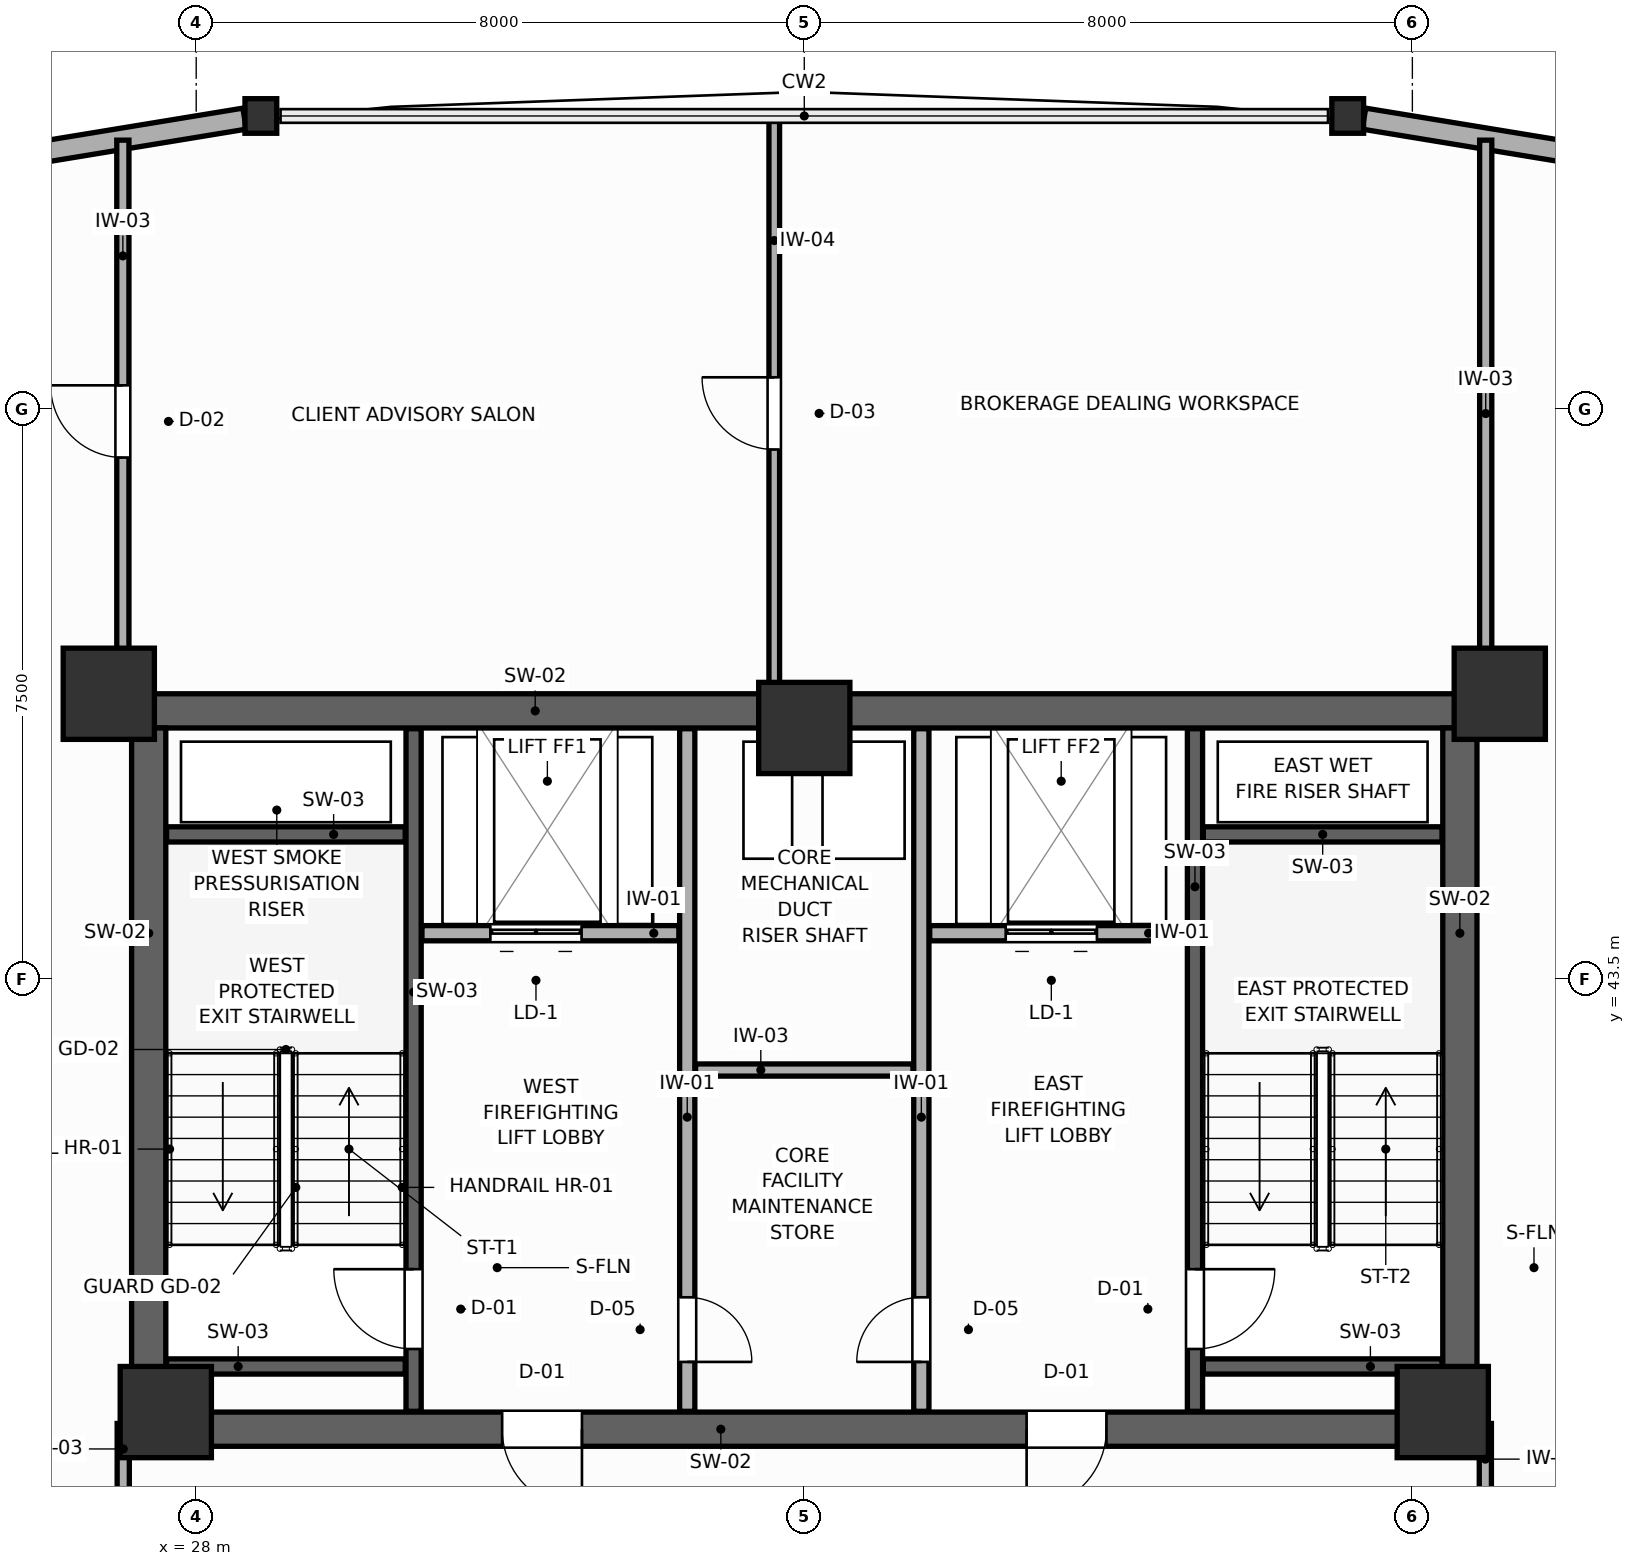
"""IFC4 building model, lengths in metres.
Left out: names, types, materials, properties, quantities, classifications, styles, units other than length and angle.
Written with IfcOpenShell. Run it as: python <this file> out.ifc"""

import sys

from ifc_helpers import new_model, si_unit, direction, frame, frame_2d, origin, origin_2d, place, context, subcontext, project, spatial, rectangle, i_section, extrude, source, transform, mapped, element, fill, save


model = new_model("IFC4")
c1 = context("Model", 3, precision=1e-05, world=origin(), true_north=direction((0.0, 1.0)))
c2 = subcontext(c1, "Body", "Model", "MODEL_VIEW")
j1 = project(units=[si_unit("LENGTHUNIT", "METRE"), si_unit("PLANEANGLEUNIT", "RADIAN")], contexts=[c1])
p1 = place(None, origin())
s1 = spatial("IfcSite", under=j1, at=p1, CompositionType="ELEMENT")
p2 = place(p1, origin())
s2 = spatial("IfcBuilding", under=s1, at=p2, CompositionType="ELEMENT")
p3 = place(p2, frame((0.0, 0.0, 102.6)))
s3 = spatial("IfcBuildingStorey", under=s2, at=p3, CompositionType="ELEMENT", Elevation=102.6)
p4 = place(p3, frame((27.15, 47.025, 0.0), z_axis=(0.0, 0.0, 1.0), x_axis=(1.0, 0.0, 0.0)))
e1 = element("IfcWall", 1, at=p4, inside=s3, PredefinedType="SHEAR", context=c2, shape_type="SweptSolid", body=[
    extrude(rectangle(XDim=17.7, YDim=0.45, at=frame_2d((8.85, 0.0))), origin(), (0.0, 0.0, 1.0), 3.6),
])
p5 = place(p3, frame((27.15, 37.575, 0.0), z_axis=(0.0, 0.0, 1.0), x_axis=(1.0, 0.0, 0.0)))
e2 = element("IfcWall", 2, at=p5, inside=s3, PredefinedType="SHEAR", context=c2, shape_type="SweptSolid", body=[
    extrude(rectangle(XDim=17.7, YDim=0.45, at=frame_2d((8.85, 0.0))), origin(), (0.0, 0.0, 1.0), 3.6),
])
p6 = place(p5, frame((4.875, 0.0, 0.0)))
e3 = element("IfcOpeningElement", 3, at=p6, cuts=e2, PredefinedType="OPENING", context=c2, shape_type="SweptSolid", body=[
    extrude(rectangle(XDim=1.05, YDim=2.1, at=frame_2d((0.525, 1.05))), frame((0.0, 0.235, 0.0), z_axis=(0.0, -1.0, 0.0), x_axis=(1.0, 0.0, 0.0)), (0.0, 0.0, 1.0), 0.47),
])
p7 = place(p5, frame((11.775, 0.0, 0.0)))
e4 = element("IfcOpeningElement", 4, at=p7, cuts=e2, PredefinedType="OPENING", context=c2, shape_type="SweptSolid", body=[
    extrude(rectangle(XDim=1.05, YDim=2.1, at=frame_2d((0.525, 1.05))), frame((0.0, 0.235, 0.0), z_axis=(0.0, -1.0, 0.0), x_axis=(1.0, 0.0, 0.0)), (0.0, 0.0, 1.0), 0.47),
])
for number, where, z_axis, x_axis in (
    (5, (27.375, 37.8, 0.0), (0.0, 0.0, 1.0), (0.0, 1.0, 0.0)),
    (6, (44.625, 37.8, 0.0), (0.0, 0.0, 1.0), (0.0, 1.0, 0.0)),
):
    element("IfcWall", number, at=place(p3, frame(where, z_axis=z_axis, x_axis=x_axis)), inside=s3, PredefinedType="SHEAR", context=c2, shape_type="SweptSolid", body=[
        extrude(rectangle(XDim=9.0, YDim=0.45, at=frame_2d((4.5, 0.0))), origin(), (0.0, 0.0, 1.0), 3.6),
    ])
m1 = source(origin(), c2, "Body", "SweptSolid", [
    extrude(rectangle(XDim=1.2, YDim=1.2, at=origin_2d()), origin(), (0.0, 0.0, 1.0), 3.6),
])
for number, where, z_axis, x_axis in (
    (7, (26.85, 47.25, 0.0), (0.0, 0.0, 1.0), (1.0, 0.0, 0.0)),
    (8, (45.15, 47.25, 0.0), (0.0, 0.0, 1.0), (1.0, 0.0, 0.0)),
    (9, (27.6, 37.8, 0.0), (0.0, 0.0, 1.0), (1.0, 0.0, 0.0)),
    (10, (44.4, 37.8, 0.0), (0.0, 0.0, 1.0), (1.0, 0.0, 0.0)),
    (11, (36.0, 46.8, 0.0), (0.0, 0.0, 1.0), (1.0, 0.0, 0.0)),
):
    element("IfcColumn", number, at=place(p3, frame(where, z_axis=z_axis, x_axis=x_axis)), inside=s3, PredefinedType="COLUMN", context=c2, shape_type="MappedRepresentation", body=[
        mapped(m1, transform((0.0, 0.0, 0.0), scale=1.0)),
    ])
m2 = source(origin(), c2, "Body", "SweptSolid", [
    extrude(i_section(OverallWidth=0.418, OverallDepth=0.455, WebThickness=0.039, FlangeThickness=0.063, FilletRadius=0.015, at=origin_2d()), origin(), (0.0, 0.0, 1.0), 3.6),
])
for number, where, z_axis, x_axis in (
    (12, (43.149, 54.852, 0.0), (0.0, 0.0, 1.0), (1.0, 0.0, 0.0)),
    (13, (28.851, 54.852, 0.0), (0.0, 0.0, 1.0), (1.0, 0.0, 0.0)),
):
    element("IfcColumn", number, at=place(p3, frame(where, z_axis=z_axis, x_axis=x_axis)), inside=s3, PredefinedType="COLUMN", context=c2, shape_type="MappedRepresentation", body=[
        mapped(m2, transform((0.0, 0.0, 0.0), scale=1.0)),
    ])
p8 = place(p3, frame((59.569, 52.155, 0.0), z_axis=(0.0, 0.0, 1.0), x_axis=(-0.986776921995, 0.162084256539, 0.0)))
e14 = element("IfcWall", 14, at=p8, inside=s3, PredefinedType="SOLIDWALL", context=c2, shape_type="SweptSolid", body=[
    extrude(rectangle(XDim=16.423, YDim=0.28, at=frame_2d((8.211, 0.0))), origin(), (0.0, 0.0, 1.0), 3.0),
])
p9 = place(p3, frame((28.637, 54.816, 0.0), z_axis=(0.0, 0.0, 1.0), x_axis=(-0.986776921995, -0.162084256539, 0.0)))
e15 = element("IfcWall", 15, at=p9, inside=s3, PredefinedType="SOLIDWALL", context=c2, shape_type="SweptSolid", body=[
    extrude(rectangle(XDim=16.423, YDim=0.28, at=frame_2d((8.211, 0.0))), origin(), (0.0, 0.0, 1.0), 2.95),
])
p10 = place(p3, frame((30.86, 37.81, 0.0), z_axis=(0.0, 0.0, 1.0), x_axis=(0.0, 1.0, 0.0)))
e16 = element("IfcWall", 16, at=p10, inside=s3, PredefinedType="SHEAR", context=c2, shape_type="SweptSolid", body=[
    extrude(rectangle(XDim=8.98, YDim=0.2, at=frame_2d((4.49, 0.0))), origin(), (0.0, 0.0, 1.0), 3.6),
])
p11 = place(p10, frame((0.82, 0.0, 0.0)))
e17 = element("IfcOpeningElement", 17, at=p11, cuts=e16, PredefinedType="OPENING", context=c2, shape_type="SweptSolid", body=[
    extrude(rectangle(XDim=1.05, YDim=2.1, at=frame_2d((0.525, 1.05))), frame((0.0, 0.11, 0.0), z_axis=(0.0, -1.0, 0.0), x_axis=(1.0, 0.0, 0.0)), (0.0, 0.0, 1.0), 0.22),
])
for number, where, z_axis, x_axis in (
    (18, (27.61, 45.4, 0.0), (0.0, 0.0, 1.0), (1.0, 0.0, 0.0)),
    (19, (27.61, 38.4, 0.0), (0.0, 0.0, 1.0), (1.0, 0.0, 0.0)),
):
    element("IfcWall", number, at=place(p3, frame(where, z_axis=z_axis, x_axis=x_axis)), inside=s3, PredefinedType="SHEAR", context=c2, shape_type="SweptSolid", body=[
        extrude(rectangle(XDim=3.14, YDim=0.2, at=frame_2d((1.57, 0.0))), origin(), (0.0, 0.0, 1.0), 3.6),
    ])
p12 = place(p3, frame((41.14, 37.81, 0.0), z_axis=(0.0, 0.0, 1.0), x_axis=(0.0, 1.0, 0.0)))
e20 = element("IfcWall", 20, at=p12, inside=s3, PredefinedType="SHEAR", context=c2, shape_type="SweptSolid", body=[
    extrude(rectangle(XDim=8.98, YDim=0.2, at=frame_2d((4.49, 0.0))), origin(), (0.0, 0.0, 1.0), 3.6),
])
p13 = place(p12, frame((0.82, 0.0, 0.0)))
e21 = element("IfcOpeningElement", 21, at=p13, cuts=e20, PredefinedType="OPENING", context=c2, shape_type="SweptSolid", body=[
    extrude(rectangle(XDim=1.05, YDim=2.1, at=frame_2d((0.525, 1.05))), frame((0.0, 0.11, 0.0), z_axis=(0.0, -1.0, 0.0), x_axis=(1.0, 0.0, 0.0)), (0.0, 0.0, 1.0), 0.22),
])
for number, where, z_axis, x_axis in (
    (22, (41.25, 45.4, 0.0), (0.0, 0.0, 1.0), (1.0, 0.0, 0.0)),
    (23, (41.25, 38.4, 0.0), (0.0, 0.0, 1.0), (1.0, 0.0, 0.0)),
):
    element("IfcWall", number, at=place(p3, frame(where, z_axis=z_axis, x_axis=x_axis)), inside=s3, PredefinedType="SHEAR", context=c2, shape_type="SweptSolid", body=[
        extrude(rectangle(XDim=3.14, YDim=0.2, at=frame_2d((1.57, 0.0))), origin(), (0.0, 0.0, 1.0), 3.6),
    ])
p14 = place(p3, frame((30.97, 44.1, 0.0), z_axis=(0.0, 0.0, 1.0), x_axis=(1.0, 0.0, 0.0)))
e24 = element("IfcWall", 24, at=p14, inside=s3, PredefinedType="PARTITIONING", context=c2, shape_type="SweptSolid", body=[
    extrude(rectangle(XDim=3.38, YDim=0.2, at=frame_2d((1.69, 0.0))), origin(), (0.0, 0.0, 1.0), 3.4),
])
p15 = place(p14, frame((0.9, 0.0, 0.0)))
e25 = element("IfcOpeningElement", 25, at=p15, cuts=e24, PredefinedType="OPENING", context=c2, shape_type="SweptSolid", body=[
    extrude(rectangle(XDim=1.2, YDim=2.1, at=frame_2d((0.6, 1.05))), frame((0.0, 0.11, 0.0), z_axis=(0.0, -1.0, 0.0), x_axis=(1.0, 0.0, 0.0)), (0.0, 0.0, 1.0), 0.22),
])
p16 = place(p3, frame((37.65, 44.1, 0.0), z_axis=(0.0, 0.0, 1.0), x_axis=(1.0, 0.0, 0.0)))
e26 = element("IfcWall", 26, at=p16, inside=s3, PredefinedType="PARTITIONING", context=c2, shape_type="SweptSolid", body=[
    extrude(rectangle(XDim=3.38, YDim=0.2, at=frame_2d((1.69, 0.0))), origin(), (0.0, 0.0, 1.0), 3.4),
])
p17 = place(p16, frame((1.0, 0.0, 0.0)))
e27 = element("IfcOpeningElement", 27, at=p17, cuts=e26, PredefinedType="OPENING", context=c2, shape_type="SweptSolid", body=[
    extrude(rectangle(XDim=1.2, YDim=2.1, at=frame_2d((0.6, 1.05))), frame((0.0, 0.11, 0.0), z_axis=(0.0, -1.0, 0.0), x_axis=(1.0, 0.0, 0.0)), (0.0, 0.0, 1.0), 0.22),
])
p18 = place(p3, frame((34.46, 37.81, 0.0), z_axis=(0.0, 0.0, 1.0), x_axis=(0.0, 1.0, 0.0)))
e28 = element("IfcWall", 28, at=p18, inside=s3, PredefinedType="PARTITIONING", context=c2, shape_type="SweptSolid", body=[
    extrude(rectangle(XDim=8.98, YDim=0.2, at=frame_2d((4.49, 0.0))), origin(), (0.0, 0.0, 1.0), 3.4),
])
p19 = place(p18, frame((0.65, 0.0, 0.0)))
e29 = element("IfcOpeningElement", 29, at=p19, cuts=e28, PredefinedType="OPENING", context=c2, shape_type="SweptSolid", body=[
    extrude(rectangle(XDim=0.85, YDim=2.05, at=frame_2d((0.425, 1.025))), frame((0.0, 0.11, 0.0), z_axis=(0.0, -1.0, 0.0), x_axis=(1.0, 0.0, 0.0)), (0.0, 0.0, 1.0), 0.22),
])
p20 = place(p3, frame((37.54, 37.81, 0.0), z_axis=(0.0, 0.0, 1.0), x_axis=(0.0, 1.0, 0.0)))
e30 = element("IfcWall", 30, at=p20, inside=s3, PredefinedType="PARTITIONING", context=c2, shape_type="SweptSolid", body=[
    extrude(rectangle(XDim=8.98, YDim=0.2, at=frame_2d((4.49, 0.0))), origin(), (0.0, 0.0, 1.0), 3.4),
])
p21 = place(p20, frame((0.65, 0.0, 0.0)))
e31 = element("IfcOpeningElement", 31, at=p21, cuts=e30, PredefinedType="OPENING", context=c2, shape_type="SweptSolid", body=[
    extrude(rectangle(XDim=0.85, YDim=2.05, at=frame_2d((0.425, 1.025))), frame((0.0, 0.11, 0.0), z_axis=(0.0, -1.0, 0.0), x_axis=(1.0, 0.0, 0.0)), (0.0, 0.0, 1.0), 0.22),
])
p22 = place(p3, frame((34.57, 42.3, 0.0), z_axis=(0.0, 0.0, 1.0), x_axis=(1.0, 0.0, 0.0)))
e32 = element("IfcWall", 32, at=p22, inside=s3, PredefinedType="PARTITIONING", context=c2, shape_type="SweptSolid", body=[
    extrude(rectangle(XDim=2.86, YDim=0.16, at=frame_2d((1.43, 0.0))), origin(), (0.0, 0.0, 1.0), 3.4),
])
p23 = place(p3, frame((27.04, 35.0, 0.0), z_axis=(0.0, 0.0, 1.0), x_axis=(0.0, 1.0, 0.0)))
e33 = element("IfcWall", 33, at=p23, inside=s3, PredefinedType="PARTITIONING", context=c2, shape_type="SweptSolid", body=[
    extrude(rectangle(XDim=2.65, YDim=0.16, at=frame_2d((1.325, 0.0))), origin(), (0.0, 0.0, 1.0), 3.4),
])
p24 = place(p23, frame((0.75, 0.0, 0.0)))
e34 = element("IfcOpeningElement", 34, at=p24, cuts=e33, PredefinedType="OPENING", context=c2, shape_type="SweptSolid", body=[
    extrude(rectangle(XDim=1.05, YDim=2.1, at=frame_2d((0.525, 1.05))), frame((0.0, 0.09, 0.0), z_axis=(0.0, -1.0, 0.0), x_axis=(1.0, 0.0, 0.0)), (0.0, 0.0, 1.0), 0.18),
])
p25 = place(p3, frame((44.96, 35.0, 0.0), z_axis=(0.0, 0.0, 1.0), x_axis=(0.0, 1.0, 0.0)))
e35 = element("IfcWall", 35, at=p25, inside=s3, PredefinedType="PARTITIONING", context=c2, shape_type="SweptSolid", body=[
    extrude(rectangle(XDim=2.65, YDim=0.16, at=frame_2d((1.325, 0.0))), origin(), (0.0, 0.0, 1.0), 3.4),
])
p26 = place(p25, frame((0.75, 0.0, 0.0)))
e36 = element("IfcOpeningElement", 36, at=p26, cuts=e35, PredefinedType="OPENING", context=c2, shape_type="SweptSolid", body=[
    extrude(rectangle(XDim=1.05, YDim=2.1, at=frame_2d((0.525, 1.05))), frame((0.0, 0.09, 0.0), z_axis=(0.0, -1.0, 0.0), x_axis=(1.0, 0.0, 0.0)), (0.0, 0.0, 1.0), 0.18),
])
p27 = place(p3, frame((27.035, 47.34, 0.0), z_axis=(0.0, 0.0, 1.0), x_axis=(0.0, 1.0, 0.0)))
e37 = element("IfcWall", 37, at=p27, inside=s3, PredefinedType="PARTITIONING", context=c2, shape_type="SweptSolid", body=[
    extrude(rectangle(XDim=7.193, YDim=0.16, at=frame_2d((3.597, 0.0))), origin(), (0.0, 0.0, 1.0), 2.95),
])
p28 = place(p27, frame((3.018, 0.0, 0.0)))
e38 = element("IfcOpeningElement", 38, at=p28, cuts=e37, PredefinedType="OPENING", context=c2, shape_type="SweptSolid", body=[
    extrude(rectangle(XDim=0.95, YDim=2.05, at=frame_2d((0.475, 1.025))), frame((0.0, 0.09, 0.0), z_axis=(0.0, -1.0, 0.0), x_axis=(1.0, 0.0, 0.0)), (0.0, 0.0, 1.0), 0.18),
])
p29 = place(p3, frame((44.965, 47.34, 0.0), z_axis=(0.0, 0.0, 1.0), x_axis=(0.0, 1.0, 0.0)))
e39 = element("IfcWall", 39, at=p29, inside=s3, PredefinedType="PARTITIONING", context=c2, shape_type="SweptSolid", body=[
    extrude(rectangle(XDim=7.193, YDim=0.16, at=frame_2d((3.597, 0.0))), origin(), (0.0, 0.0, 1.0), 2.95),
])
p30 = place(p3, frame((35.605, 47.252, 0.0), z_axis=(0.0, 0.0, 1.0), x_axis=(0.0, 1.0, 0.0)))
e40 = element("IfcWall", 40, at=p30, inside=s3, PredefinedType="PARTITIONING", context=c2, shape_type="SweptSolid", body=[
    extrude(rectangle(XDim=7.58, YDim=0.14, at=frame_2d((3.79, 0.0))), origin(), (0.0, 0.0, 1.0), 3.4),
])
p31 = place(p30, frame((3.211, 0.0, 0.0)))
e41 = element("IfcOpeningElement", 41, at=p31, cuts=e40, PredefinedType="OPENING", context=c2, shape_type="SweptSolid", body=[
    extrude(rectangle(XDim=0.95, YDim=2.05, at=frame_2d((0.475, 1.025))), frame((0.0, 0.08, 0.0), z_axis=(0.0, -1.0, 0.0), x_axis=(1.0, 0.0, 0.0)), (0.0, 0.0, 1.0), 0.16),
])
p32 = place(p11, origin())
e42 = element("IfcDoor", 42, at=p32, inside=s3, OperationType="SINGLE_SWING_RIGHT", PredefinedType="DOOR", context=c2, shape_type="SweptSolid", body=[
    extrude(rectangle(XDim=1.05, YDim=2.1, at=frame_2d((0.525, 1.05))), frame((0.0, 0.025, 0.0), z_axis=(0.0, -1.0, 0.0), x_axis=(1.0, 0.0, 0.0)), (0.0, 0.0, 1.0), 0.05),
])
fill(e17, e42)
p33 = place(p13, frame((1.05, 0.0, 0.0), z_axis=(0.0, 0.0, 1.0), x_axis=(-1.0, 0.0, 0.0)))
e43 = element("IfcDoor", 43, at=p33, inside=s3, OperationType="SINGLE_SWING_LEFT", PredefinedType="DOOR", context=c2, shape_type="SweptSolid", body=[
    extrude(rectangle(XDim=1.05, YDim=2.1, at=frame_2d((0.525, 1.05))), frame((0.0, 0.025, 0.0), z_axis=(0.0, -1.0, 0.0), x_axis=(1.0, 0.0, 0.0)), (0.0, 0.0, 1.0), 0.05),
])
fill(e21, e43)
p34 = place(p15, origin())
e44 = element("IfcDoor", 44, at=p34, inside=s3, OperationType="DOUBLE_DOOR_SLIDING", PredefinedType="DOOR", context=c2, shape_type="SweptSolid", body=[
    extrude(rectangle(XDim=1.2, YDim=2.1, at=frame_2d((0.6, 1.05))), frame((0.0, 0.025, 0.0), z_axis=(0.0, -1.0, 0.0), x_axis=(1.0, 0.0, 0.0)), (0.0, 0.0, 1.0), 0.05),
])
fill(e25, e44)
p35 = place(p17, origin())
e45 = element("IfcDoor", 45, at=p35, inside=s3, OperationType="DOUBLE_DOOR_SLIDING", PredefinedType="DOOR", context=c2, shape_type="SweptSolid", body=[
    extrude(rectangle(XDim=1.2, YDim=2.1, at=frame_2d((0.6, 1.05))), frame((0.0, 0.025, 0.0), z_axis=(0.0, -1.0, 0.0), x_axis=(1.0, 0.0, 0.0)), (0.0, 0.0, 1.0), 0.05),
])
fill(e27, e45)
p36 = place(p19, frame((0.85, 0.0, 0.0), z_axis=(0.0, 0.0, 1.0), x_axis=(-1.0, 0.0, 0.0)))
e46 = element("IfcDoor", 46, at=p36, inside=s3, OperationType="SINGLE_SWING_RIGHT", PredefinedType="DOOR", context=c2, shape_type="SweptSolid", body=[
    extrude(rectangle(XDim=0.85, YDim=2.05, at=frame_2d((0.425, 1.025))), frame((0.0, 0.025, 0.0), z_axis=(0.0, -1.0, 0.0), x_axis=(1.0, 0.0, 0.0)), (0.0, 0.0, 1.0), 0.05),
])
fill(e29, e46)
p37 = place(p21, origin())
e47 = element("IfcDoor", 47, at=p37, inside=s3, OperationType="SINGLE_SWING_LEFT", PredefinedType="DOOR", context=c2, shape_type="SweptSolid", body=[
    extrude(rectangle(XDim=0.85, YDim=2.05, at=frame_2d((0.425, 1.025))), frame((0.0, 0.025, 0.0), z_axis=(0.0, -1.0, 0.0), x_axis=(1.0, 0.0, 0.0)), (0.0, 0.0, 1.0), 0.05),
])
fill(e31, e47)
p38 = place(p28, origin())
e48 = element("IfcDoor", 48, at=p38, inside=s3, OperationType="SINGLE_SWING_RIGHT", PredefinedType="DOOR", context=c2, shape_type="SweptSolid", body=[
    extrude(rectangle(XDim=0.95, YDim=2.05, at=frame_2d((0.475, 1.025))), frame((0.0, 0.025, 0.0), z_axis=(0.0, -1.0, 0.0), x_axis=(1.0, 0.0, 0.0)), (0.0, 0.0, 1.0), 0.05),
])
fill(e38, e48)
p39 = place(p31, origin())
e49 = element("IfcDoor", 49, at=p39, inside=s3, OperationType="SINGLE_SWING_RIGHT", PredefinedType="DOOR", context=c2, shape_type="SweptSolid", body=[
    extrude(rectangle(XDim=0.95, YDim=2.05, at=frame_2d((0.475, 1.025))), frame((0.0, 0.025, 0.0), z_axis=(0.0, -1.0, 0.0), x_axis=(1.0, 0.0, 0.0)), (0.0, 0.0, 1.0), 0.05),
])
fill(e41, e49)
p40 = place(p6, frame((1.05, 0.0, 0.0), z_axis=(0.0, 0.0, 1.0), x_axis=(-1.0, 0.0, 0.0)))
e50 = element("IfcDoor", 50, at=p40, inside=s3, OperationType="SINGLE_SWING_LEFT", PredefinedType="DOOR", context=c2, shape_type="SweptSolid", body=[
    extrude(rectangle(XDim=1.05, YDim=2.1, at=frame_2d((0.525, 1.05))), frame((0.0, 0.025, 0.0), z_axis=(0.0, -1.0, 0.0), x_axis=(1.0, 0.0, 0.0)), (0.0, 0.0, 1.0), 0.05),
])
fill(e3, e50)
p41 = place(p7, frame((1.05, 0.0, 0.0), z_axis=(0.0, 0.0, 1.0), x_axis=(-1.0, 0.0, 0.0)))
e51 = element("IfcDoor", 51, at=p41, inside=s3, OperationType="SINGLE_SWING_RIGHT", PredefinedType="DOOR", context=c2, shape_type="SweptSolid", body=[
    extrude(rectangle(XDim=1.05, YDim=2.1, at=frame_2d((0.525, 1.05))), frame((0.0, 0.025, 0.0), z_axis=(0.0, -1.0, 0.0), x_axis=(1.0, 0.0, 0.0)), (0.0, 0.0, 1.0), 0.05),
])
fill(e4, e51)
save(model, sys.argv[1])
